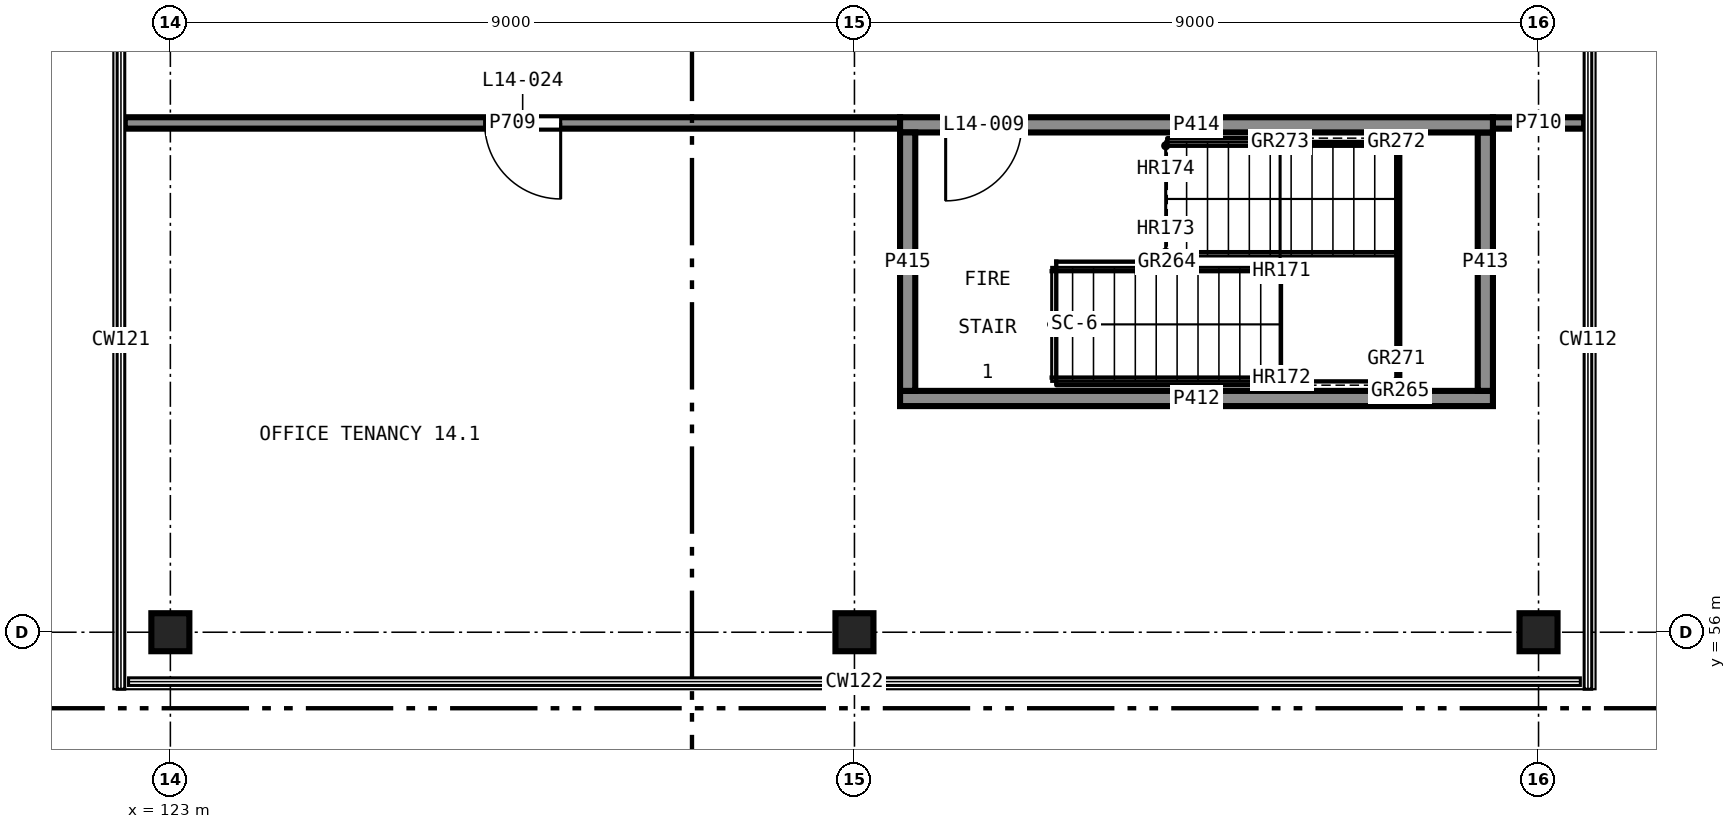
"""IFC4 building model, lengths in metres.
Left out: names, types, materials, properties, quantities, classifications, styles, units other than length and angle.
Written with IfcOpenShell. Run it as: python <this file> out.ifc"""

import sys

from ifc_helpers import new_model, si_unit, direction, frame, frame_2d, origin, origin_2d, place, context, subcontext, project, spatial, rectangle, extrude, element, fill, save


model = new_model("IFC4")
c1 = context("Model", 3, precision=1e-05, world=origin(), true_north=direction((0.0, 1.0)))
c2 = subcontext(c1, "Body", "Model", "MODEL_VIEW")
j1 = project(units=[si_unit("LENGTHUNIT", "METRE"), si_unit("PLANEANGLEUNIT", "RADIAN")], contexts=[c1])
p1 = place(None, origin())
s1 = spatial("IfcSite", under=j1, at=p1, CompositionType="ELEMENT")
p2 = place(p1, origin())
s2 = spatial("IfcBuilding", under=s1, at=p2, CompositionType="ELEMENT")
p3 = place(p2, frame((0.0, 0.0, 57.5)))
s3 = spatial("IfcBuildingStorey", under=s2, at=p3, CompositionType="ELEMENT", Elevation=57.5)
for number, where, z_axis, x_axis in (
    (1, (123.0, 56.0, 0.0), (0.0, 0.0, 1.0), (1.0, 0.0, 0.0)),
    (2, (132.0, 56.0, 0.0), (0.0, 0.0, 1.0), (1.0, 0.0, 0.0)),
    (3, (141.0, 56.0, 0.0), (0.0, 0.0, 1.0), (1.0, 0.0, 0.0)),
):
    element("IfcColumn", number, at=place(p3, frame(where, z_axis=z_axis, x_axis=x_axis)), inside=s3, PredefinedType="COLUMN", context=c2, shape_type="SweptSolid", body=[
        extrude(rectangle(XDim=0.5, YDim=0.5, at=origin_2d()), origin(), (0.0, 0.0, 1.0), 4.0),
    ])
p4 = place(p3, frame((132.6, 59.075, 0.0), z_axis=(0.0, 0.0, 1.0), x_axis=(1.0, 0.0, 0.0)))
e4 = element("IfcWall", 4, at=p4, inside=s3, PredefinedType="SHEAR", context=c2, shape_type="SweptSolid", body=[
    extrude(rectangle(XDim=7.8, YDim=0.2, at=frame_2d((3.9, 0.0))), origin(), (0.0, 0.0, 1.0), 3.75),
])
p5 = place(p3, frame((140.3, 59.175, 0.0), z_axis=(0.0, 0.0, 1.0), x_axis=(0.0, 1.0, 0.0)))
e5 = element("IfcWall", 5, at=p5, inside=s3, PredefinedType="SHEAR", context=c2, shape_type="SweptSolid", body=[
    extrude(rectangle(XDim=3.4, YDim=0.2, at=frame_2d((1.7, 0.0))), origin(), (0.0, 0.0, 1.0), 3.75),
])
p6 = place(p3, frame((140.4, 62.675, 0.0), z_axis=(0.0, 0.0, 1.0), x_axis=(-1.0, 0.0, 0.0)))
e6 = element("IfcWall", 6, at=p6, inside=s3, PredefinedType="SHEAR", context=c2, shape_type="SweptSolid", body=[
    extrude(rectangle(XDim=7.8, YDim=0.2, at=frame_2d((3.9, 0.0))), origin(), (0.0, 0.0, 1.0), 3.75),
])
p7 = place(p6, frame((6.2, 0.0, 0.0)))
e7 = element("IfcOpeningElement", 7, at=p7, cuts=e6, PredefinedType="OPENING", context=c2, shape_type="SweptSolid", body=[
    extrude(rectangle(XDim=1.0, YDim=2.1, at=frame_2d((0.5, 1.05))), frame((0.0, 0.11, 0.0), z_axis=(0.0, -1.0, 0.0), x_axis=(1.0, 0.0, 0.0)), (0.0, 0.0, 1.0), 0.22),
])
p8 = place(p3, frame((132.7, 62.575, 0.0), z_axis=(0.0, 0.0, 1.0), x_axis=(0.0, -1.0, 0.0)))
e8 = element("IfcWall", 8, at=p8, inside=s3, PredefinedType="SHEAR", context=c2, shape_type="SweptSolid", body=[
    extrude(rectangle(XDim=3.4, YDim=0.2, at=frame_2d((1.7, 0.0))), origin(), (0.0, 0.0, 1.0), 3.75),
])
p9 = place(p3, frame((132.6, 62.7, 0.0), z_axis=(0.0, 0.0, 1.0), x_axis=(-1.0, 0.0, 0.0)))
e9 = element("IfcWall", 9, at=p9, inside=s3, PredefinedType="PARTITIONING", context=c2, shape_type="SweptSolid", body=[
    extrude(rectangle(XDim=10.2, YDim=0.15, at=frame_2d((5.1, 0.0))), origin(), (0.0, 0.0, 1.0), 3.75),
])
p10 = place(p9, frame((4.465, 0.0, 0.0)))
e10 = element("IfcOpeningElement", 10, at=p10, cuts=e9, PredefinedType="OPENING", context=c2, shape_type="SweptSolid", body=[
    extrude(rectangle(XDim=1.0, YDim=2.1, at=frame_2d((0.5, 1.05))), frame((0.0, 0.085, 0.0), z_axis=(0.0, -1.0, 0.0), x_axis=(1.0, 0.0, 0.0)), (0.0, 0.0, 1.0), 0.17),
])
p11 = place(p3, frame((141.6, 62.7, 0.0), z_axis=(0.0, 0.0, 1.0), x_axis=(-1.0, 0.0, 0.0)))
e11 = element("IfcWall", 11, at=p11, inside=s3, PredefinedType="PARTITIONING", context=c2, shape_type="SweptSolid", body=[
    extrude(rectangle(XDim=1.2, YDim=0.15, at=frame_2d((0.6, 0.0))), origin(), (0.0, 0.0, 1.0), 3.75),
])
p12 = place(p7, origin())
e12 = element("IfcDoor", 12, at=p12, inside=s3, OperationType="SINGLE_SWING_LEFT", PredefinedType="DOOR", context=c2, shape_type="SweptSolid", body=[
    extrude(rectangle(XDim=1.0, YDim=2.1, at=frame_2d((0.5, 1.05))), frame((0.0, 0.025, 0.0), z_axis=(0.0, -1.0, 0.0), x_axis=(1.0, 0.0, 0.0)), (0.0, 0.0, 1.0), 0.05),
])
fill(e7, e12)
p13 = place(p10, origin())
e13 = element("IfcDoor", 13, at=p13, inside=s3, OperationType="SINGLE_SWING_RIGHT", PredefinedType="DOOR", context=c2, shape_type="SweptSolid", body=[
    extrude(rectangle(XDim=1.0, YDim=2.1, at=frame_2d((0.5, 1.05))), frame((0.0, 0.025, 0.0), z_axis=(0.0, -1.0, 0.0), x_axis=(1.0, 0.0, 0.0)), (0.0, 0.0, 1.0), 0.05),
])
fill(e10, e13)
save(model, sys.argv[1])
